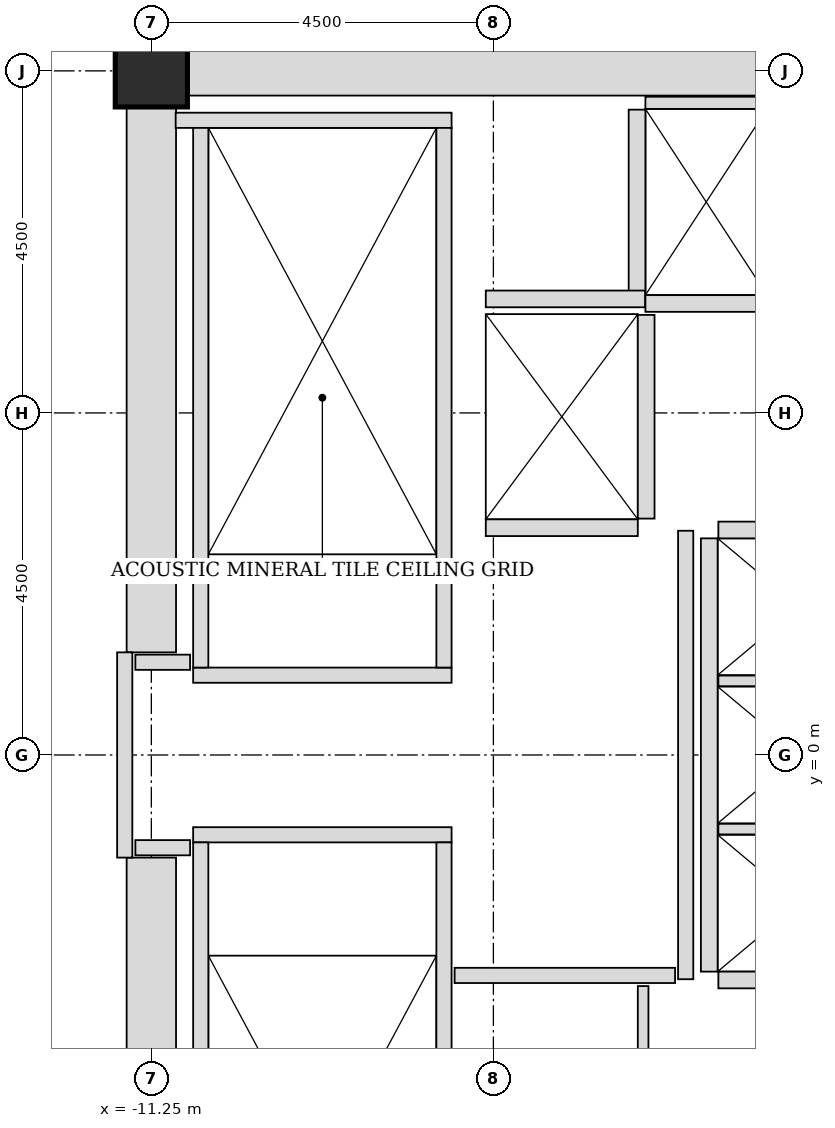
"""IFC4 building model, lengths in metres.
Left out: names, types, materials, properties, quantities, classifications, styles, units other than length and angle.
Written with IfcOpenShell. Run it as: python <this file> out.ifc"""

import sys

from ifc_helpers import new_model, si_unit, direction, frame, frame_2d, origin, origin_2d, place, context, subcontext, project, spatial, rectangle, hollow_rectangle, extrude, source, transform, mapped, element, fill, save


model = new_model("IFC4")
c1 = context("Model", 3, precision=1e-05, world=origin(), true_north=direction((0.0, 1.0)))
c2 = subcontext(c1, "Body", "Model", "MODEL_VIEW")
j1 = project(units=[si_unit("LENGTHUNIT", "METRE"), si_unit("PLANEANGLEUNIT", "RADIAN")], contexts=[c1])
p1 = place(None, origin())
s1 = spatial("IfcSite", under=j1, at=p1, CompositionType="ELEMENT")
p2 = place(p1, origin())
s2 = spatial("IfcBuilding", under=s1, at=p2, CompositionType="ELEMENT")
p3 = place(p2, frame((0.0, 0.0, 40.6)))
s3 = spatial("IfcBuildingStorey", under=s2, at=p3, CompositionType="ELEMENT", Elevation=40.6)
m1 = source(origin(), c2, "Body", "SweptSolid", [
    extrude(rectangle(XDim=10.025, YDim=0.65, at=frame_2d((5.012, 0.0))), origin(), (0.0, 0.0, 1.0), 3.8),
])
p4 = place(p3, frame((-11.575, 9.0, 0.0), z_axis=(0.0, 0.0, 1.0), x_axis=(1.0, 0.0, 0.0)))
e1 = element("IfcWall", 1, at=p4, inside=s3, PredefinedType="SHEAR", context=c2, shape_type="MappedRepresentation", body=[
    mapped(m1, transform((0.0, 0.0, 0.0), x_axis=(1.0, 0.0, 0.0), y_axis=(0.0, 1.0, 0.0), z_axis=(0.0, 0.0, 1.0), scale=1.0)),
])
m2 = source(origin(), c2, "Body", "SweptSolid", [
    extrude(rectangle(XDim=7.325, YDim=0.65, at=frame_2d((3.663, 0.0))), origin(), (0.0, 0.0, 1.0), 3.8),
])
for number, where, z_axis, x_axis in (
    (2, (-11.25, -8.675, 0.0), (0.0, 0.0, 1.0), (0.0, 1.0, 0.0)),
    (3, (-11.25, 1.35, 0.0), (0.0, 0.0, 1.0), (0.0, 1.0, 0.0)),
):
    element("IfcWall", number, at=place(p3, frame(where, z_axis=z_axis, x_axis=x_axis)), inside=s3, PredefinedType="SHEAR", context=c2, shape_type="MappedRepresentation", body=[
        mapped(m2, transform((0.0, 0.0, 0.0), x_axis=(1.0, 0.0, 0.0), y_axis=(0.0, 1.0, 0.0), z_axis=(0.0, 0.0, 1.0), scale=1.0)),
    ])
m3 = source(origin(), c2, "Body", "SweptSolid", [
    extrude(hollow_rectangle(XDim=0.95, YDim=0.95, WallThickness=0.045, InnerFilletRadius=0.045, OuterFilletRadius=0.09, at=origin_2d()), origin(), (0.0, 0.0, 1.0), 3.8),
])
p5 = place(p3, frame((-11.25, 9.0, 0.0), z_axis=(0.0, 0.0, 1.0), x_axis=(1.0, 0.0, 0.0)))
e4 = element("IfcColumn", 4, at=p5, inside=s3, PredefinedType="COLUMN", context=c2, shape_type="MappedRepresentation", body=[
    mapped(m3, transform((0.0, 0.0, 0.0), x_axis=(1.0, 0.0, 0.0), y_axis=(0.0, 1.0, 0.0), z_axis=(0.0, 0.0, 1.0), scale=1.0)),
])
m4 = source(origin(), c2, "Body", "SweptSolid", [
    extrude(rectangle(XDim=3.4, YDim=0.2, at=frame_2d((1.7, 0.0))), origin(), (0.0, 0.0, 1.0), 3.8),
])
p6 = place(p3, frame((-7.3, 1.05, 0.0), z_axis=(0.0, 0.0, 1.0), x_axis=(-1.0, 0.0, 0.0)))
e5 = element("IfcWall", 5, at=p6, inside=s3, PredefinedType="SOLIDWALL", context=c2, shape_type="MappedRepresentation", body=[
    mapped(m4, transform((0.0, 0.0, 0.0), x_axis=(1.0, 0.0, 0.0), y_axis=(0.0, 1.0, 0.0), z_axis=(0.0, 0.0, 1.0), scale=1.0)),
])
m5 = source(origin(), c2, "Body", "SweptSolid", [
    extrude(rectangle(XDim=3.63, YDim=0.2, at=frame_2d((1.815, 0.0))), origin(), (0.0, 0.0, 1.0), 3.8),
])
p7 = place(p3, frame((-7.3, 8.35, 0.0), z_axis=(0.0, 0.0, 1.0), x_axis=(-1.0, 0.0, 0.0)))
e6 = element("IfcWall", 6, at=p7, inside=s3, PredefinedType="SOLIDWALL", context=c2, shape_type="MappedRepresentation", body=[
    mapped(m5, transform((0.0, 0.0, 0.0), x_axis=(1.0, 0.0, 0.0), y_axis=(0.0, 1.0, 0.0), z_axis=(0.0, 0.0, 1.0), scale=1.0)),
])
m6 = source(origin(), c2, "Body", "SweptSolid", [
    extrude(rectangle(XDim=7.1, YDim=0.2, at=frame_2d((3.55, 0.0))), origin(), (0.0, 0.0, 1.0), 3.8),
])
p8 = place(p3, frame((-7.4, 1.15, 0.0), z_axis=(0.0, 0.0, 1.0), x_axis=(0.0, 1.0, 0.0)))
e7 = element("IfcWall", 7, at=p8, inside=s3, PredefinedType="SOLIDWALL", context=c2, shape_type="MappedRepresentation", body=[
    mapped(m6, transform((0.0, 0.0, 0.0), x_axis=(1.0, 0.0, 0.0), y_axis=(0.0, 1.0, 0.0), z_axis=(0.0, 0.0, 1.0), scale=1.0)),
])
p9 = place(p8, frame((0.18, 0.0, 0.0)))
e8 = element("IfcOpeningElement", 8, at=p9, cuts=e7, PredefinedType="OPENING", context=c2, shape_type="SweptSolid", body=[
    extrude(rectangle(XDim=1.1, YDim=2.15, at=frame_2d((0.55, 1.075))), frame((0.0, 0.11, 0.0), z_axis=(0.0, -1.0, 0.0), x_axis=(1.0, 0.0, 0.0)), (0.0, 0.0, 1.0), 0.22),
])
p10 = place(p3, frame((-10.6, 1.15, 0.0), z_axis=(0.0, 0.0, 1.0), x_axis=(0.0, 1.0, 0.0)))
e9 = element("IfcWall", 9, at=p10, inside=s3, PredefinedType="SOLIDWALL", context=c2, shape_type="MappedRepresentation", body=[
    mapped(m6, transform((0.0, 0.0, 0.0), x_axis=(1.0, 0.0, 0.0), y_axis=(0.0, 1.0, 0.0), z_axis=(0.0, 0.0, 1.0), scale=1.0)),
])
p11 = place(p3, frame((-10.7, -1.05, 0.0), z_axis=(0.0, 0.0, 1.0), x_axis=(1.0, 0.0, 0.0)))
e10 = element("IfcWall", 10, at=p11, inside=s3, PredefinedType="SOLIDWALL", context=c2, shape_type="MappedRepresentation", body=[
    mapped(m4, transform((0.0, 0.0, 0.0), x_axis=(1.0, 0.0, 0.0), y_axis=(0.0, 1.0, 0.0), z_axis=(0.0, 0.0, 1.0), scale=1.0)),
])
p12 = place(p3, frame((-10.6, -1.15, 0.0), z_axis=(0.0, 0.0, 1.0), x_axis=(0.0, -1.0, 0.0)))
e11 = element("IfcWall", 11, at=p12, inside=s3, PredefinedType="SOLIDWALL", context=c2, shape_type="MappedRepresentation", body=[
    mapped(m6, transform((0.0, 0.0, 0.0), x_axis=(1.0, 0.0, 0.0), y_axis=(0.0, 1.0, 0.0), z_axis=(0.0, 0.0, 1.0), scale=1.0)),
])
p13 = place(p3, frame((-7.4, -1.15, 0.0), z_axis=(0.0, 0.0, 1.0), x_axis=(0.0, -1.0, 0.0)))
e12 = element("IfcWall", 12, at=p13, inside=s3, PredefinedType="SOLIDWALL", context=c2, shape_type="MappedRepresentation", body=[
    mapped(m6, transform((0.0, 0.0, 0.0), x_axis=(1.0, 0.0, 0.0), y_axis=(0.0, 1.0, 0.0), z_axis=(0.0, 0.0, 1.0), scale=1.0)),
])
p14 = place(p13, frame((0.18, 0.0, 0.0)))
e13 = element("IfcOpeningElement", 13, at=p14, cuts=e12, PredefinedType="OPENING", context=c2, shape_type="SweptSolid", body=[
    extrude(rectangle(XDim=1.1, YDim=2.15, at=frame_2d((0.55, 1.075))), frame((0.0, 0.11, 0.0), z_axis=(0.0, -1.0, 0.0), x_axis=(1.0, 0.0, 0.0)), (0.0, 0.0, 1.0), 0.22),
])
m7 = source(origin(), c2, "Body", "SweptSolid", [
    extrude(rectangle(XDim=2.0, YDim=0.22, at=frame_2d((1.0, 0.0))), origin(), (0.0, 0.0, 1.0), 3.535),
])
p15 = place(p3, frame((-6.85, 2.99, 0.0), z_axis=(0.0, 0.0, 1.0), x_axis=(1.0, 0.0, 0.0)))
e14 = element("IfcWall", 14, at=p15, inside=s3, PredefinedType="SOLIDWALL", context=c2, shape_type="MappedRepresentation", body=[
    mapped(m7, transform((0.0, 0.0, 0.0), x_axis=(1.0, 0.0, 0.0), y_axis=(0.0, 1.0, 0.0), z_axis=(0.0, 0.0, 1.0), scale=1.0)),
])
p16 = place(p15, frame((0.4, 0.0, 0.0)))
e15 = element("IfcOpeningElement", 15, at=p16, cuts=e14, PredefinedType="OPENING", context=c2, shape_type="SweptSolid", body=[
    extrude(rectangle(XDim=1.2, YDim=2.2, at=frame_2d((0.6, 1.1))), frame((0.0, 0.12, 0.0), z_axis=(0.0, -1.0, 0.0), x_axis=(1.0, 0.0, 0.0)), (0.0, 0.0, 1.0), 0.24),
])
m8 = source(origin(), c2, "Body", "SweptSolid", [
    extrude(rectangle(XDim=2.68, YDim=0.22, at=frame_2d((1.34, 0.0))), origin(), (0.0, 0.0, 1.0), 3.535),
])
p17 = place(p3, frame((-4.74, 3.11, 0.0), z_axis=(0.0, 0.0, 1.0), x_axis=(0.0, 1.0, 0.0)))
e16 = element("IfcWall", 16, at=p17, inside=s3, PredefinedType="SOLIDWALL", context=c2, shape_type="MappedRepresentation", body=[
    mapped(m8, transform((0.0, 0.0, 0.0), x_axis=(1.0, 0.0, 0.0), y_axis=(0.0, 1.0, 0.0), z_axis=(0.0, 0.0, 1.0), scale=1.0)),
])
m9 = source(origin(), c2, "Body", "SweptSolid", [
    extrude(rectangle(XDim=3.2, YDim=0.22, at=frame_2d((1.6, 0.0))), origin(), (0.0, 0.0, 1.0), 3.535),
])
p18 = place(p3, frame((-4.75, 5.94, 0.0), z_axis=(0.0, 0.0, 1.0), x_axis=(1.0, 0.0, 0.0)))
e17 = element("IfcWall", 17, at=p18, inside=s3, PredefinedType="SOLIDWALL", context=c2, shape_type="MappedRepresentation", body=[
    mapped(m9, transform((0.0, 0.0, 0.0), x_axis=(1.0, 0.0, 0.0), y_axis=(0.0, 1.0, 0.0), z_axis=(0.0, 0.0, 1.0), scale=1.0)),
])
p19 = place(p18, frame((0.25, 0.0, 0.0)))
e18 = element("IfcOpeningElement", 18, at=p19, cuts=e17, PredefinedType="OPENING", context=c2, shape_type="SweptSolid", body=[
    extrude(rectangle(XDim=1.1, YDim=2.2, at=frame_2d((0.55, 1.1))), frame((0.0, 0.12, 0.0), z_axis=(0.0, -1.0, 0.0), x_axis=(1.0, 0.0, 0.0)), (0.0, 0.0, 1.0), 0.24),
])
p20 = place(p18, frame((1.875, 0.0, 0.0)))
e19 = element("IfcOpeningElement", 19, at=p20, cuts=e17, PredefinedType="OPENING", context=c2, shape_type="SweptSolid", body=[
    extrude(rectangle(XDim=1.1, YDim=2.2, at=frame_2d((0.55, 1.1))), frame((0.0, 0.12, 0.0), z_axis=(0.0, -1.0, 0.0), x_axis=(1.0, 0.0, 0.0)), (0.0, 0.0, 1.0), 0.24),
])
m10 = source(origin(), c2, "Body", "SweptSolid", [
    extrude(rectangle(XDim=3.2, YDim=0.16, at=frame_2d((1.6, 0.0))), origin(), (0.0, 0.0, 1.0), 2.425),
])
p21 = place(p3, frame((-1.55, 8.58, 0.0), z_axis=(0.0, 0.0, 1.0), x_axis=(-1.0, 0.0, 0.0)))
e20 = element("IfcWall", 20, at=p21, inside=s3, PredefinedType="PARTITIONING", context=c2, shape_type="MappedRepresentation", body=[
    mapped(m10, transform((0.0, 0.0, 0.0), x_axis=(1.0, 0.0, 0.0), y_axis=(0.0, 1.0, 0.0), z_axis=(0.0, 0.0, 1.0), scale=1.0)),
])
m11 = source(origin(), c2, "Body", "SweptSolid", [
    extrude(rectangle(XDim=2.43, YDim=0.22, at=frame_2d((1.215, 0.0))), origin(), (0.0, 0.0, 1.0), 3.535),
])
p22 = place(p3, frame((-4.86, 8.49, 0.0), z_axis=(0.0, 0.0, 1.0), x_axis=(0.0, -1.0, 0.0)))
e21 = element("IfcWall", 21, at=p22, inside=s3, PredefinedType="SOLIDWALL", context=c2, shape_type="MappedRepresentation", body=[
    mapped(m11, transform((0.0, 0.0, 0.0), x_axis=(1.0, 0.0, 0.0), y_axis=(0.0, 1.0, 0.0), z_axis=(0.0, 0.0, 1.0), scale=1.0)),
])
m12 = source(origin(), c2, "Body", "SweptSolid", [
    extrude(rectangle(XDim=5.7, YDim=0.22, at=frame_2d((2.85, 0.0))), origin(), (0.0, 0.0, 1.0), 3.535),
])
p23 = place(p3, frame((-3.91, 2.85, 0.0), z_axis=(0.0, 0.0, 1.0), x_axis=(0.0, -1.0, 0.0)))
e22 = element("IfcWall", 22, at=p23, inside=s3, PredefinedType="SOLIDWALL", context=c2, shape_type="MappedRepresentation", body=[
    mapped(m12, transform((0.0, 0.0, 0.0), x_axis=(1.0, 0.0, 0.0), y_axis=(0.0, 1.0, 0.0), z_axis=(0.0, 0.0, 1.0), scale=1.0)),
])
m13 = source(origin(), c2, "Body", "SweptSolid", [
    extrude(rectangle(XDim=2.13, YDim=0.22, at=frame_2d((1.065, 0.0))), origin(), (0.0, 0.0, 1.0), 3.535),
])
p24 = place(p3, frame((-3.79, -2.96, 0.0), z_axis=(0.0, 0.0, 1.0), x_axis=(1.0, 0.0, 0.0)))
e23 = element("IfcWall", 23, at=p24, inside=s3, PredefinedType="SOLIDWALL", context=c2, shape_type="MappedRepresentation", body=[
    mapped(m13, transform((0.0, 0.0, 0.0), x_axis=(1.0, 0.0, 0.0), y_axis=(0.0, 1.0, 0.0), z_axis=(0.0, 0.0, 1.0), scale=1.0)),
])
m14 = source(origin(), c2, "Body", "SweptSolid", [
    extrude(rectangle(XDim=2.13, YDim=0.14, at=frame_2d((1.065, 0.0))), origin(), (0.0, 0.0, 1.0), 3.535),
])
for number, where, z_axis, x_axis in (
    (24, (-3.79, -0.975, 0.0), (0.0, 0.0, 1.0), (1.0, 0.0, 0.0)),
    (25, (-3.79, 0.975, 0.0), (0.0, 0.0, 1.0), (1.0, 0.0, 0.0)),
):
    element("IfcWall", number, at=place(p3, frame(where, z_axis=z_axis, x_axis=x_axis)), inside=s3, PredefinedType="PARTITIONING", context=c2, shape_type="MappedRepresentation", body=[
        mapped(m14, transform((0.0, 0.0, 0.0), x_axis=(1.0, 0.0, 0.0), y_axis=(0.0, 1.0, 0.0), z_axis=(0.0, 0.0, 1.0), scale=1.0)),
    ])
p25 = place(p3, frame((-1.66, 2.96, 0.0), z_axis=(0.0, 0.0, 1.0), x_axis=(-1.0, 0.0, 0.0)))
e26 = element("IfcWall", 26, at=p25, inside=s3, PredefinedType="SOLIDWALL", context=c2, shape_type="MappedRepresentation", body=[
    mapped(m13, transform((0.0, 0.0, 0.0), x_axis=(1.0, 0.0, 0.0), y_axis=(0.0, 1.0, 0.0), z_axis=(0.0, 0.0, 1.0), scale=1.0)),
])
m15 = source(origin(), c2, "Body", "SweptSolid", [
    extrude(rectangle(XDim=2.095, YDim=0.22, at=frame_2d((1.048, 0.0))), origin(), (0.0, 0.0, 1.0), 3.535),
])
p26 = place(p3, frame((-6.85, 6.0, 0.0), z_axis=(0.0, 0.0, 1.0), x_axis=(1.0, 0.0, 0.0)))
e27 = element("IfcWall", 27, at=p26, inside=s3, PredefinedType="SOLIDWALL", context=c2, shape_type="MappedRepresentation", body=[
    mapped(m15, transform((0.0, 0.0, 0.0), x_axis=(1.0, 0.0, 0.0), y_axis=(0.0, 1.0, 0.0), z_axis=(0.0, 0.0, 1.0), scale=1.0)),
])
m16 = source(origin(), c2, "Body", "SweptSolid", [
    extrude(rectangle(XDim=2.7, YDim=0.2, at=frame_2d((1.35, 0.0))), origin(), (0.0, 0.0, 1.0), 2.425),
])
p27 = place(p3, frame((-11.6, -1.35, 0.0), z_axis=(0.0, 0.0, 1.0), x_axis=(0.0, 1.0, 0.0)))
e28 = element("IfcWall", 28, at=p27, inside=s3, PredefinedType="PARTITIONING", context=c2, shape_type="MappedRepresentation", body=[
    mapped(m16, transform((0.0, 0.0, 0.0), x_axis=(1.0, 0.0, 0.0), y_axis=(0.0, 1.0, 0.0), z_axis=(0.0, 0.0, 1.0), scale=1.0)),
])
p28 = place(p27, frame((0.75, 0.0, 0.0)))
e29 = element("IfcOpeningElement", 29, at=p28, cuts=e28, PredefinedType="OPENING", context=c2, shape_type="SweptSolid", body=[
    extrude(rectangle(XDim=1.2, YDim=2.15, at=frame_2d((0.6, 1.075))), frame((0.0, 0.11, 0.0), z_axis=(0.0, -1.0, 0.0), x_axis=(1.0, 0.0, 0.0)), (0.0, 0.0, 1.0), 0.22),
])
m17 = source(origin(), c2, "Body", "SweptSolid", [
    extrude(rectangle(XDim=5.9, YDim=0.2, at=frame_2d((2.95, 0.0))), origin(), (0.0, 0.0, 1.0), 3.535),
])
p29 = place(p3, frame((-4.22, -2.95, 0.0), z_axis=(0.0, 0.0, 1.0), x_axis=(0.0, 1.0, 0.0)))
e30 = element("IfcWall", 30, at=p29, inside=s3, PredefinedType="PARTITIONING", context=c2, shape_type="MappedRepresentation", body=[
    mapped(m17, transform((0.0, 0.0, 0.0), x_axis=(1.0, 0.0, 0.0), y_axis=(0.0, 1.0, 0.0), z_axis=(0.0, 0.0, 1.0), scale=1.0)),
])
m18 = source(origin(), c2, "Body", "SweptSolid", [
    extrude(rectangle(XDim=2.9, YDim=0.2, at=frame_2d((1.45, 0.0))), origin(), (0.0, 0.0, 1.0), 3.535),
])
p30 = place(p3, frame((-7.26, -2.9, 0.0), z_axis=(0.0, 0.0, 1.0), x_axis=(1.0, 0.0, 0.0)))
e31 = element("IfcWall", 31, at=p30, inside=s3, PredefinedType="PARTITIONING", context=c2, shape_type="MappedRepresentation", body=[
    mapped(m18, transform((0.0, 0.0, 0.0), x_axis=(1.0, 0.0, 0.0), y_axis=(0.0, 1.0, 0.0), z_axis=(0.0, 0.0, 1.0), scale=1.0)),
])
m19 = source(origin(), c2, "Body", "SweptSolid", [
    extrude(rectangle(XDim=0.72, YDim=0.2, at=frame_2d((0.36, 0.0))), origin(), (0.0, 0.0, 1.0), 3.535),
])
for number, where, z_axis, x_axis in (
    (32, (-11.46, 1.22, 0.0), (0.0, 0.0, 1.0), (1.0, 0.0, 0.0)),
    (33, (-11.46, -1.22, 0.0), (0.0, 0.0, 1.0), (1.0, 0.0, 0.0)),
):
    element("IfcWall", number, at=place(p3, frame(where, z_axis=z_axis, x_axis=x_axis)), inside=s3, PredefinedType="PARTITIONING", context=c2, shape_type="MappedRepresentation", body=[
        mapped(m19, transform((0.0, 0.0, 0.0), x_axis=(1.0, 0.0, 0.0), y_axis=(0.0, 1.0, 0.0), z_axis=(0.0, 0.0, 1.0), scale=1.0)),
    ])
m20 = source(origin(), c2, "Body", "SweptSolid", [
    extrude(rectangle(XDim=1.26, YDim=0.14, at=frame_2d((0.63, 0.0))), origin(), (0.0, 0.0, 1.0), 3.535),
])
p31 = place(p3, frame((-4.78, -4.3, 0.0), z_axis=(0.0, 0.0, 1.0), x_axis=(0.0, 1.0, 0.0)))
e34 = element("IfcWall", 34, at=p31, inside=s3, PredefinedType="PARTITIONING", context=c2, shape_type="MappedRepresentation", body=[
    mapped(m20, transform((0.0, 0.0, 0.0), x_axis=(1.0, 0.0, 0.0), y_axis=(0.0, 1.0, 0.0), z_axis=(0.0, 0.0, 1.0), scale=1.0)),
])
m21 = source(origin(), c2, "Body", "SweptSolid", [
    extrude(rectangle(XDim=1.1, YDim=2.15, at=frame_2d((0.55, 1.075))), frame((0.0, 0.025, 0.0), z_axis=(0.0, -1.0, 0.0), x_axis=(1.0, 0.0, 0.0)), (0.0, 0.0, 1.0), 0.05),
])
p32 = place(p9, origin())
e35 = element("IfcDoor", 35, at=p32, inside=s3, OperationType="SINGLE_SWING_RIGHT", PredefinedType="DOOR", context=c2, shape_type="MappedRepresentation", body=[
    mapped(m21, transform((0.0, 0.0, 0.0), x_axis=(1.0, 0.0, 0.0), y_axis=(0.0, 1.0, 0.0), z_axis=(0.0, 0.0, 1.0), scale=1.0)),
])
fill(e8, e35)
p33 = place(p14, origin())
e36 = element("IfcDoor", 36, at=p33, inside=s3, OperationType="SINGLE_SWING_RIGHT", PredefinedType="DOOR", context=c2, shape_type="MappedRepresentation", body=[
    mapped(m21, transform((0.0, 0.0, 0.0), x_axis=(1.0, 0.0, 0.0), y_axis=(0.0, 1.0, 0.0), z_axis=(0.0, 0.0, 1.0), scale=1.0)),
])
fill(e13, e36)
m22 = source(origin(), c2, "Body", "SweptSolid", [
    extrude(rectangle(XDim=1.2, YDim=2.2, at=frame_2d((0.6, 1.1))), frame((0.0, 0.025, 0.0), z_axis=(0.0, -1.0, 0.0), x_axis=(1.0, 0.0, 0.0)), (0.0, 0.0, 1.0), 0.05),
])
p34 = place(p16, origin())
e37 = element("IfcDoor", 37, at=p34, inside=s3, OperationType="SLIDING_TO_LEFT", PredefinedType="DOOR", context=c2, shape_type="MappedRepresentation", body=[
    mapped(m22, transform((0.0, 0.0, 0.0), x_axis=(1.0, 0.0, 0.0), y_axis=(0.0, 1.0, 0.0), z_axis=(0.0, 0.0, 1.0), scale=1.0)),
])
fill(e15, e37)
m23 = source(origin(), c2, "Body", "SweptSolid", [
    extrude(rectangle(XDim=1.1, YDim=2.2, at=frame_2d((0.55, 1.1))), frame((0.0, 0.025, 0.0), z_axis=(0.0, -1.0, 0.0), x_axis=(1.0, 0.0, 0.0)), (0.0, 0.0, 1.0), 0.05),
])
p35 = place(p19, origin())
e38 = element("IfcDoor", 38, at=p35, inside=s3, OperationType="DOUBLE_DOOR_SLIDING", PredefinedType="DOOR", context=c2, shape_type="MappedRepresentation", body=[
    mapped(m23, transform((0.0, 0.0, 0.0), x_axis=(1.0, 0.0, 0.0), y_axis=(0.0, 1.0, 0.0), z_axis=(0.0, 0.0, 1.0), scale=1.0)),
])
fill(e18, e38)
m24 = source(origin(), c2, "Body", "SweptSolid", [
    extrude(rectangle(XDim=1.2, YDim=2.15, at=frame_2d((0.6, 1.075))), frame((0.0, 0.025, 0.0), z_axis=(0.0, -1.0, 0.0), x_axis=(1.0, 0.0, 0.0)), (0.0, 0.0, 1.0), 0.05),
])
p36 = place(p28, origin())
e39 = element("IfcDoor", 39, at=p36, inside=s3, OperationType="SINGLE_SWING_LEFT", PredefinedType="DOOR", context=c2, shape_type="MappedRepresentation", body=[
    mapped(m24, transform((0.0, 0.0, 0.0), x_axis=(1.0, 0.0, 0.0), y_axis=(0.0, 1.0, 0.0), z_axis=(0.0, 0.0, 1.0), scale=1.0)),
])
fill(e29, e39)
save(model, sys.argv[1])
